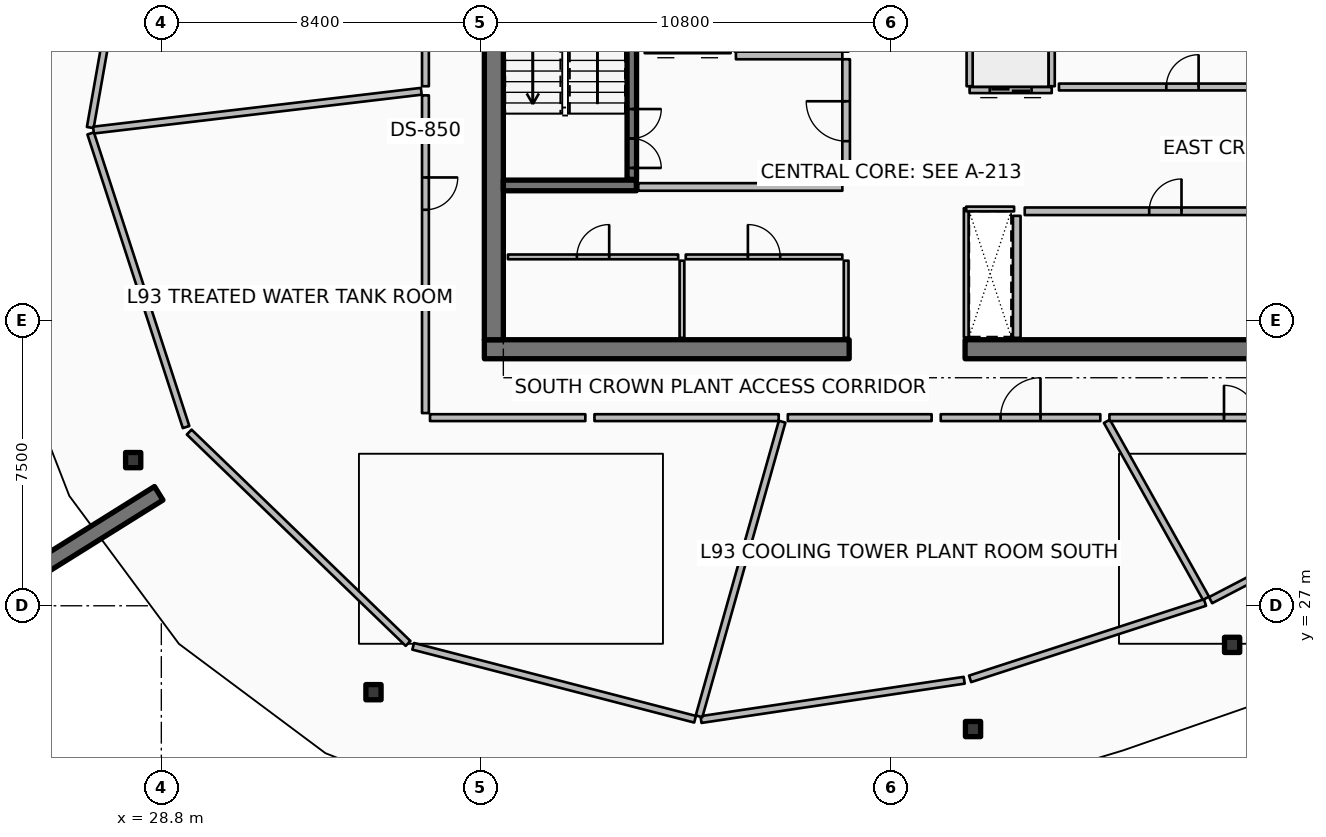
"""IFC4 building model, lengths in metres.
Left out: names, types, materials, properties, quantities, classifications, styles, units other than length and angle.
Written with IfcOpenShell. Run it as: python <this file> out.ifc"""

import sys

from ifc_helpers import new_model, si_unit, direction, frame, frame_2d, origin, origin_2d, place, context, subcontext, project, spatial, rectangle, hollow_rectangle, extrude, element, fill, save


model = new_model("IFC4")
c1 = context("Model", 3, precision=1e-05, world=origin(), true_north=direction((0.0, 1.0)))
c2 = subcontext(c1, "Body", "Model", "MODEL_VIEW")
j1 = project(units=[si_unit("LENGTHUNIT", "METRE"), si_unit("PLANEANGLEUNIT", "RADIAN")], contexts=[c1])
p1 = place(None, origin())
s1 = spatial("IfcSite", under=j1, at=p1, CompositionType="ELEMENT")
p2 = place(p1, origin())
s2 = spatial("IfcBuilding", under=s1, at=p2, CompositionType="ELEMENT")
p3 = place(p2, frame((0.0, 0.0, 370.4)))
s3 = spatial("IfcBuildingStorey", under=s2, at=p3, CompositionType="ELEMENT", Elevation=370.4)
p4 = place(p3, frame((37.3, 33.75, 0.0), z_axis=(0.0, 0.0, 1.0), x_axis=(1.0, 0.0, 0.0)))
e1 = element("IfcWall", 1, at=p4, inside=s3, PredefinedType="SHEAR", context=c2, shape_type="SweptSolid", body=[
    extrude(rectangle(XDim=9.6, YDim=0.5, at=frame_2d((4.8, 0.0))), origin(), (0.0, 0.0, 1.0), 3.6),
])
p5 = place(p3, frame((49.95, 33.75, 0.0), z_axis=(0.0, 0.0, 1.0), x_axis=(1.0, 0.0, 0.0)))
e2 = element("IfcWall", 2, at=p5, inside=s3, PredefinedType="SHEAR", context=c2, shape_type="SweptSolid", body=[
    extrude(rectangle(XDim=9.6, YDim=0.5, at=frame_2d((4.8, 0.0))), origin(), (0.0, 0.0, 1.0), 3.6),
])
p6 = place(p3, frame((37.55, 34.0, 0.0), z_axis=(0.0, 0.0, 1.0), x_axis=(0.0, 1.0, 0.0)))
e3 = element("IfcWall", 3, at=p6, inside=s3, PredefinedType="SHEAR", context=c2, shape_type="SweptSolid", body=[
    extrude(rectangle(XDim=16.0, YDim=0.5, at=frame_2d((8.0, 0.0))), origin(), (0.0, 0.0, 1.0), 3.6),
])
p7 = place(p3, frame((37.8, 38.06, 0.0), z_axis=(0.0, 0.0, 1.0), x_axis=(1.0, 0.0, 0.0)))
e4 = element("IfcWall", 4, at=p7, inside=s3, PredefinedType="SHEAR", context=c2, shape_type="SweptSolid", body=[
    extrude(rectangle(XDim=3.5, YDim=0.28, at=frame_2d((1.75, 0.0))), origin(), (0.0, 0.0, 1.0), 3.6),
])
p8 = place(p3, frame((28.731, 29.959, 0.0), z_axis=(0.0, 0.0, 1.0), x_axis=(-0.848033572426, -0.529942506352, 0.0)))
e5 = element("IfcWall", 5, at=p8, inside=s3, PredefinedType="SOLIDWALL", context=c2, shape_type="SweptSolid", body=[
    extrude(rectangle(XDim=3.5, YDim=0.42, at=frame_2d((1.75, 0.0))), origin(), (0.0, 0.0, 1.0), 3.6),
])
for number, where, z_axis, x_axis in (
    (6, (28.059, 30.833, 0.0), (0.0, 0.0, 1.0), (1.0, 0.0, 0.0)),
    (7, (34.383, 24.726, 0.0), (0.0, 0.0, 1.0), (1.0, 0.0, 0.0)),
    (8, (50.159, 23.756, 0.0), (0.0, 0.0, 1.0), (1.0, 0.0, 0.0)),
    (9, (56.977, 25.971, 0.0), (0.0, 0.0, 1.0), (1.0, 0.0, 0.0)),
):
    element("IfcColumn", number, at=place(p3, frame(where, z_axis=z_axis, x_axis=x_axis)), inside=s3, PredefinedType="COLUMN", context=c2, shape_type="SweptSolid", body=[
        extrude(hollow_rectangle(XDim=0.4, YDim=0.4, WallThickness=0.02, InnerFilletRadius=0.02, OuterFilletRadius=0.04, at=origin_2d()), origin(), (0.0, 0.0, 1.0), 3.32),
    ])
p9 = place(p3, frame((41.18, 38.22, 0.0), z_axis=(0.0, 0.0, 1.0), x_axis=(0.0, 1.0, 0.0)))
e10 = element("IfcWall", 10, at=p9, inside=s3, PredefinedType="SOLIDWALL", context=c2, shape_type="SweptSolid", body=[
    extrude(rectangle(XDim=7.56, YDim=0.25, at=frame_2d((3.78, 0.0))), origin(), (0.0, 0.0, 1.0), 3.32),
])
p10 = place(p9, frame((0.3, 0.0, 0.0)))
e11 = element("IfcOpeningElement", 11, at=p10, cuts=e10, PredefinedType="OPENING", context=c2, shape_type="SweptSolid", body=[
    extrude(rectangle(XDim=1.55, YDim=2.15, at=frame_2d((0.775, 1.075))), frame((0.0, 0.135, 0.0), z_axis=(0.0, -1.0, 0.0), x_axis=(1.0, 0.0, 0.0)), (0.0, 0.0, 1.0), 0.27),
])
p11 = place(p3, frame((51.52, 37.38, 0.0), z_axis=(0.0, 0.0, 1.0), x_axis=(1.0, 0.0, 0.0)))
e12 = element("IfcWall", 12, at=p11, inside=s3, PredefinedType="PARTITIONING", context=c2, shape_type="SweptSolid", body=[
    extrude(rectangle(XDim=7.4, YDim=0.2, at=frame_2d((3.7, 0.0))), origin(), (0.0, 0.0, 1.0), 3.32),
])
p12 = place(p11, frame((3.275, 0.0, 0.0)))
e13 = element("IfcOpeningElement", 13, at=p12, cuts=e12, PredefinedType="OPENING", context=c2, shape_type="SweptSolid", body=[
    extrude(rectangle(XDim=0.85, YDim=2.06, at=frame_2d((0.425, 1.03))), frame((0.0, 0.11, 0.0), z_axis=(0.0, -1.0, 0.0), x_axis=(1.0, 0.0, 0.0)), (0.0, 0.0, 1.0), 0.22),
])
p13 = place(p3, frame((51.31, 34.05, 0.0), z_axis=(0.0, 0.0, 1.0), x_axis=(0.0, 1.0, 0.0)))
e14 = element("IfcWall", 14, at=p13, inside=s3, PredefinedType="PARTITIONING", context=c2, shape_type="SweptSolid", body=[
    extrude(rectangle(XDim=3.21, YDim=0.2, at=frame_2d((1.605, 0.0))), origin(), (0.0, 0.0, 1.0), 3.32),
])
p14 = place(p3, frame((43.78, 41.62, 0.0), z_axis=(0.0, 0.0, 1.0), x_axis=(-1.0, 0.0, 0.0)))
e15 = element("IfcWall", 15, at=p14, inside=s3, PredefinedType="PARTITIONING", context=c2, shape_type="SweptSolid", body=[
    extrude(rectangle(XDim=2.26, YDim=0.16, at=frame_2d((1.13, 0.0))), origin(), (0.0, 0.0, 1.0), 3.32),
])
p15 = place(p14, frame((0.58, 0.0, 0.0)))
e16 = element("IfcOpeningElement", 16, at=p15, cuts=e15, PredefinedType="OPENING", context=c2, shape_type="SweptSolid", body=[
    extrude(rectangle(XDim=1.1, YDim=2.1, at=frame_2d((0.55, 1.05))), frame((0.0, 0.09, 0.0), z_axis=(0.0, -1.0, 0.0), x_axis=(1.0, 0.0, 0.0)), (0.0, 0.0, 1.0), 0.18),
])
p16 = place(p3, frame((52.23, 40.57, 0.0), z_axis=(0.0, 0.0, 1.0), x_axis=(-1.0, 0.0, 0.0)))
e17 = element("IfcWall", 17, at=p16, inside=s3, PredefinedType="PARTITIONING", context=c2, shape_type="SweptSolid", body=[
    extrude(rectangle(XDim=2.16, YDim=0.16, at=frame_2d((1.08, 0.0))), origin(), (0.0, 0.0, 1.0), 3.32),
])
p17 = place(p16, frame((0.53, 0.0, 0.0)))
e18 = element("IfcOpeningElement", 18, at=p17, cuts=e17, PredefinedType="OPENING", context=c2, shape_type="SweptSolid", body=[
    extrude(rectangle(XDim=1.1, YDim=2.1, at=frame_2d((0.55, 1.05))), frame((0.0, 0.09, 0.0), z_axis=(0.0, -1.0, 0.0), x_axis=(1.0, 0.0, 0.0)), (0.0, 0.0, 1.0), 0.18),
])
for number, where, z_axis, x_axis in (
    (19, (52.23, 40.67, 0.0), (0.0, 0.0, 1.0), (0.0, 1.0, 0.0)),
    (20, (50.07, 40.67, 0.0), (0.0, 0.0, 1.0), (0.0, 1.0, 0.0)),
):
    element("IfcWall", number, at=place(p3, frame(where, z_axis=z_axis, x_axis=x_axis)), inside=s3, PredefinedType="PARTITIONING", context=c2, shape_type="SweptSolid", body=[
        extrude(rectangle(XDim=2.16, YDim=0.16, at=frame_2d((1.08, 0.0))), origin(), (0.0, 0.0, 1.0), 3.32),
    ])
p18 = place(p3, frame((52.42, 40.65, 0.0), z_axis=(0.0, 0.0, 1.0), x_axis=(1.0, 0.0, 0.0)))
e21 = element("IfcWall", 21, at=p18, inside=s3, PredefinedType="PARTITIONING", context=c2, shape_type="SweptSolid", body=[
    extrude(rectangle(XDim=6.5, YDim=0.18, at=frame_2d((3.25, 0.0))), origin(), (0.0, 0.0, 1.0), 3.32),
])
p19 = place(p18, frame((2.825, 0.0, 0.0)))
e22 = element("IfcOpeningElement", 22, at=p19, cuts=e21, PredefinedType="OPENING", context=c2, shape_type="SweptSolid", body=[
    extrude(rectangle(XDim=0.85, YDim=2.06, at=frame_2d((0.425, 1.03))), frame((0.0, 0.1, 0.0), z_axis=(0.0, -1.0, 0.0), x_axis=(1.0, 0.0, 0.0)), (0.0, 0.0, 1.0), 0.2),
])
for number, where, z_axis, x_axis in (
    (23, (46.82, 34.05, 0.0), (0.0, 0.0, 1.0), (0.0, 1.0, 0.0)),
    (24, (42.5, 34.05, 0.0), (0.0, 0.0, 1.0), (0.0, 1.0, 0.0)),
):
    element("IfcWall", number, at=place(p3, frame(where, z_axis=z_axis, x_axis=x_axis)), inside=s3, PredefinedType="PARTITIONING", context=c2, shape_type="SweptSolid", body=[
        extrude(rectangle(XDim=2.03, YDim=0.125, at=frame_2d((1.015, 0.0))), origin(), (0.0, 0.0, 1.0), 2.76),
    ])
p20 = place(p3, frame((37.92, 36.18, 0.0), z_axis=(0.0, 0.0, 1.0), x_axis=(1.0, 0.0, 0.0)))
e25 = element("IfcWall", 25, at=p20, inside=s3, PredefinedType="PARTITIONING", context=c2, shape_type="SweptSolid", body=[
    extrude(rectangle(XDim=4.48, YDim=0.125, at=frame_2d((2.24, 0.0))), origin(), (0.0, 0.0, 1.0), 2.76),
])
p21 = place(p20, frame((1.815, 0.0, 0.0)))
e26 = element("IfcOpeningElement", 26, at=p21, cuts=e25, PredefinedType="OPENING", context=c2, shape_type="SweptSolid", body=[
    extrude(rectangle(XDim=0.85, YDim=2.06, at=frame_2d((0.425, 1.03))), frame((0.0, 0.073, 0.0), z_axis=(0.0, -1.0, 0.0), x_axis=(1.0, 0.0, 0.0)), (0.0, 0.0, 1.0), 0.145),
])
p22 = place(p3, frame((42.6, 36.18, 0.0), z_axis=(0.0, 0.0, 1.0), x_axis=(1.0, 0.0, 0.0)))
e27 = element("IfcWall", 27, at=p22, inside=s3, PredefinedType="PARTITIONING", context=c2, shape_type="SweptSolid", body=[
    extrude(rectangle(XDim=4.12, YDim=0.125, at=frame_2d((2.06, 0.0))), origin(), (0.0, 0.0, 1.0), 2.76),
])
p23 = place(p22, frame((1.635, 0.0, 0.0)))
e28 = element("IfcOpeningElement", 28, at=p23, cuts=e27, PredefinedType="OPENING", context=c2, shape_type="SweptSolid", body=[
    extrude(rectangle(XDim=0.85, YDim=2.06, at=frame_2d((0.425, 1.03))), frame((0.0, 0.073, 0.0), z_axis=(0.0, -1.0, 0.0), x_axis=(1.0, 0.0, 0.0)), (0.0, 0.0, 1.0), 0.145),
])
p24 = place(p3, frame((41.35, 38.02, 0.0), z_axis=(0.0, 0.0, 1.0), x_axis=(1.0, 0.0, 0.0)))
e29 = element("IfcWall", 29, at=p24, inside=s3, PredefinedType="PARTITIONING", context=c2, shape_type="SweptSolid", body=[
    extrude(rectangle(XDim=5.37, YDim=0.2, at=frame_2d((2.685, 0.0))), origin(), (0.0, 0.0, 1.0), 3.32),
])
p25 = place(p3, frame((43.92, 41.48, 0.0), z_axis=(0.0, 0.0, 1.0), x_axis=(1.0, 0.0, 0.0)))
e30 = element("IfcWall", 30, at=p25, inside=s3, PredefinedType="PARTITIONING", context=c2, shape_type="SweptSolid", body=[
    extrude(rectangle(XDim=2.8, YDim=0.2, at=frame_2d((1.4, 0.0))), origin(), (0.0, 0.0, 1.0), 3.32),
])
p26 = place(p3, frame((46.82, 38.12, 0.0), z_axis=(0.0, 0.0, 1.0), x_axis=(0.0, 1.0, 0.0)))
e31 = element("IfcWall", 31, at=p26, inside=s3, PredefinedType="PARTITIONING", context=c2, shape_type="SweptSolid", body=[
    extrude(rectangle(XDim=3.26, YDim=0.2, at=frame_2d((1.63, 0.0))), origin(), (0.0, 0.0, 1.0), 3.32),
])
p27 = place(p26, frame((1.105, 0.0, 0.0)))
e32 = element("IfcOpeningElement", 32, at=p27, cuts=e31, PredefinedType="OPENING", context=c2, shape_type="SweptSolid", body=[
    extrude(rectangle(XDim=1.05, YDim=2.1, at=frame_2d((0.525, 1.05))), frame((0.0, 0.11, 0.0), z_axis=(0.0, -1.0, 0.0), x_axis=(1.0, 0.0, 0.0)), (0.0, 0.0, 1.0), 0.22),
])
p28 = place(p3, frame((49.98, 34.06, 0.0), z_axis=(0.0, 0.0, 1.0), x_axis=(0.0, 1.0, 0.0)))
e33 = element("IfcWall", 33, at=p28, inside=s3, PredefinedType="PARTITIONING", context=c2, shape_type="SweptSolid", body=[
    extrude(rectangle(XDim=3.4, YDim=0.125, at=frame_2d((1.7, 0.0))), origin(), (0.0, 0.0, 1.0), 2.76),
])
p29 = place(p3, frame((49.98, 37.44, 0.0), z_axis=(0.0, 0.0, 1.0), x_axis=(1.0, 0.0, 0.0)))
e34 = element("IfcWall", 34, at=p29, inside=s3, PredefinedType="PARTITIONING", context=c2, shape_type="SweptSolid", body=[
    extrude(rectangle(XDim=1.26, YDim=0.125, at=frame_2d((0.63, 0.0))), origin(), (0.0, 0.0, 1.0), 2.76),
])
p30 = place(p3, frame((28.32, 47.468, 0.0), z_axis=(0.0, 0.0, 1.0), x_axis=(-0.173668776466, -0.984804120666, 0.0)))
e35 = element("IfcWall", 35, at=p30, inside=s3, PredefinedType="PARTITIONING", context=c2, shape_type="SweptSolid", body=[
    extrude(rectangle(XDim=8.006, YDim=0.18, at=frame_2d((4.003, 0.0))), origin(), (0.0, 0.0, 1.0), 2.76),
])
p31 = place(p3, frame((26.941, 39.428, 0.0), z_axis=(0.0, 0.0, 1.0), x_axis=(0.309024234991, -0.951054163646, 0.0)))
e36 = element("IfcWall", 36, at=p31, inside=s3, PredefinedType="PARTITIONING", context=c2, shape_type="SweptSolid", body=[
    extrude(rectangle(XDim=8.124, YDim=0.18, at=frame_2d((4.062, 0.0))), origin(), (0.0, 0.0, 1.0), 2.76),
])
p32 = place(p3, frame((29.533, 31.57, 0.0), z_axis=(0.0, 0.0, 1.0), x_axis=(0.719364153135, -0.694633151516, 0.0)))
e37 = element("IfcWall", 37, at=p32, inside=s3, PredefinedType="PARTITIONING", context=c2, shape_type="SweptSolid", body=[
    extrude(rectangle(XDim=8.006, YDim=0.18, at=frame_2d((4.003, 0.0))), origin(), (0.0, 0.0, 1.0), 2.76),
])
p33 = place(p3, frame((35.427, 25.934, 0.0), z_axis=(0.0, 0.0, 1.0), x_axis=(0.968117205342, -0.250497658115, 0.0)))
e38 = element("IfcWall", 38, at=p33, inside=s3, PredefinedType="PARTITIONING", context=c2, shape_type="SweptSolid", body=[
    extrude(rectangle(XDim=7.662, YDim=0.18, at=frame_2d((3.831, 0.0))), origin(), (0.0, 0.0, 1.0), 2.76),
])
p34 = place(p3, frame((43.001, 24.006, 0.0), z_axis=(0.0, 0.0, 1.0), x_axis=(0.989034336252, 0.147685753256, 0.0)))
e39 = element("IfcWall", 39, at=p34, inside=s3, PredefinedType="PARTITIONING", context=c2, shape_type="SweptSolid", body=[
    extrude(rectangle(XDim=7.003, YDim=0.18, at=frame_2d((3.501, 0.0))), origin(), (0.0, 0.0, 1.0), 2.76),
])
p35 = place(p3, frame((50.082, 25.077, 0.0), z_axis=(0.0, 0.0, 1.0), x_axis=(0.95105283999, 0.309028308649, 0.0)))
e40 = element("IfcWall", 40, at=p35, inside=s3, PredefinedType="PARTITIONING", context=c2, shape_type="SweptSolid", body=[
    extrude(rectangle(XDim=6.499, YDim=0.18, at=frame_2d((3.25, 0.0))), origin(), (0.0, 0.0, 1.0), 2.76),
])
p36 = place(p3, frame((56.41, 27.147, 0.0), z_axis=(0.0, 0.0, 1.0), x_axis=(0.886949494865, 0.461866423935, 0.0)))
e41 = element("IfcWall", 41, at=p36, inside=s3, PredefinedType="PARTITIONING", context=c2, shape_type="SweptSolid", body=[
    extrude(rectangle(XDim=7.002, YDim=0.18, at=frame_2d((3.501, 0.0))), origin(), (0.0, 0.0, 1.0), 2.76),
])
p37 = place(p3, frame((35.75, 45.335, 0.0), z_axis=(0.0, 0.0, 1.0), x_axis=(0.0, -1.0, 0.0)))
e42 = element("IfcWall", 42, at=p37, inside=s3, PredefinedType="PARTITIONING", context=c2, shape_type="SweptSolid", body=[
    extrude(rectangle(XDim=4.665, YDim=0.18, at=frame_2d((2.333, 0.0))), origin(), (0.0, 0.0, 1.0), 2.76),
])
p38 = place(p3, frame((35.641, 40.537, 0.0), z_axis=(0.0, 0.0, 1.0), x_axis=(-0.993070751419, -0.117518010011, 0.0)))
e43 = element("IfcWall", 43, at=p38, inside=s3, PredefinedType="PARTITIONING", context=c2, shape_type="SweptSolid", body=[
    extrude(rectangle(XDim=8.686, YDim=0.18, at=frame_2d((4.343, 0.0))), origin(), (0.0, 0.0, 1.0), 2.76),
])
p39 = place(p3, frame((35.75, 40.43, 0.0), z_axis=(0.0, 0.0, 1.0), x_axis=(0.0, -1.0, 0.0)))
e44 = element("IfcWall", 44, at=p39, inside=s3, PredefinedType="PARTITIONING", context=c2, shape_type="SweptSolid", body=[
    extrude(rectangle(XDim=5.17, YDim=0.18, at=frame_2d((2.585, 0.0))), origin(), (0.0, 0.0, 1.0), 2.76),
])
p40 = place(p39, frame((2.16, 0.0, 0.0)))
e45 = element("IfcOpeningElement", 45, at=p40, cuts=e44, PredefinedType="OPENING", context=c2, shape_type="SweptSolid", body=[
    extrude(rectangle(XDim=0.85, YDim=2.06, at=frame_2d((0.425, 1.03))), frame((0.0, 0.1, 0.0), z_axis=(0.0, -1.0, 0.0), x_axis=(1.0, 0.0, 0.0)), (0.0, 0.0, 1.0), 0.2),
])
p41 = place(p3, frame((35.75, 35.02, 0.0), z_axis=(0.0, 0.0, 1.0), x_axis=(0.0, -1.0, 0.0)))
e46 = element("IfcWall", 46, at=p41, inside=s3, PredefinedType="PARTITIONING", context=c2, shape_type="SweptSolid", body=[
    extrude(rectangle(XDim=2.95, YDim=0.18, at=frame_2d((1.475, 0.0))), origin(), (0.0, 0.0, 1.0), 2.76),
])
p42 = place(p3, frame((35.87, 31.95, 0.0), z_axis=(0.0, 0.0, 1.0), x_axis=(1.0, 0.0, 0.0)))
e47 = element("IfcWall", 47, at=p42, inside=s3, PredefinedType="PARTITIONING", context=c2, shape_type="SweptSolid", body=[
    extrude(rectangle(XDim=4.087, YDim=0.18, at=frame_2d((2.043, 0.0))), origin(), (0.0, 0.0, 1.0), 2.76),
])
p43 = place(p3, frame((40.197, 31.95, 0.0), z_axis=(0.0, 0.0, 1.0), x_axis=(1.0, 0.0, 0.0)))
e48 = element("IfcWall", 48, at=p43, inside=s3, PredefinedType="PARTITIONING", context=c2, shape_type="SweptSolid", body=[
    extrude(rectangle(XDim=4.848, YDim=0.18, at=frame_2d((2.424, 0.0))), origin(), (0.0, 0.0, 1.0), 2.76),
])
p44 = place(p3, frame((45.136, 31.844, 0.0), z_axis=(0.0, 0.0, 1.0), x_axis=(-0.271457285698, -0.962450488099, 0.0)))
e49 = element("IfcWall", 49, at=p44, inside=s3, PredefinedType="PARTITIONING", context=c2, shape_type="SweptSolid", body=[
    extrude(rectangle(XDim=8.056, YDim=0.18, at=frame_2d((4.028, 0.0))), origin(), (0.0, 0.0, 1.0), 2.76),
])
p45 = place(p3, frame((45.286, 31.95, 0.0), z_axis=(0.0, 0.0, 1.0), x_axis=(1.0, 0.0, 0.0)))
e50 = element("IfcWall", 50, at=p45, inside=s3, PredefinedType="PARTITIONING", context=c2, shape_type="SweptSolid", body=[
    extrude(rectangle(XDim=3.784, YDim=0.18, at=frame_2d((1.892, 0.0))), origin(), (0.0, 0.0, 1.0), 2.76),
])
p46 = place(p3, frame((49.31, 31.95, 0.0), z_axis=(0.0, 0.0, 1.0), x_axis=(1.0, 0.0, 0.0)))
e51 = element("IfcWall", 51, at=p46, inside=s3, PredefinedType="PARTITIONING", context=c2, shape_type="SweptSolid", body=[
    extrude(rectangle(XDim=4.199, YDim=0.18, at=frame_2d((2.099, 0.0))), origin(), (0.0, 0.0, 1.0), 2.76),
])
p47 = place(p46, frame((1.574, 0.0, 0.0)))
e52 = element("IfcOpeningElement", 52, at=p47, cuts=e51, PredefinedType="OPENING", context=c2, shape_type="SweptSolid", body=[
    extrude(rectangle(XDim=1.05, YDim=2.1, at=frame_2d((0.525, 1.05))), frame((0.0, 0.1, 0.0), z_axis=(0.0, -1.0, 0.0), x_axis=(1.0, 0.0, 0.0)), (0.0, 0.0, 1.0), 0.2),
])
p48 = place(p3, frame((53.682, 31.854, 0.0), z_axis=(0.0, 0.0, 1.0), x_axis=(0.488622869326, -0.872495095443, 0.0)))
e53 = element("IfcWall", 53, at=p48, inside=s3, PredefinedType="PARTITIONING", context=c2, shape_type="SweptSolid", body=[
    extrude(rectangle(XDim=5.337, YDim=0.18, at=frame_2d((2.668, 0.0))), origin(), (0.0, 0.0, 1.0), 2.76),
])
p49 = place(p3, frame((53.748, 31.95, 0.0), z_axis=(0.0, 0.0, 1.0), x_axis=(1.0, 0.0, 0.0)))
e54 = element("IfcWall", 54, at=p49, inside=s3, PredefinedType="PARTITIONING", context=c2, shape_type="SweptSolid", body=[
    extrude(rectangle(XDim=6.88, YDim=0.18, at=frame_2d((3.44, 0.0))), origin(), (0.0, 0.0, 1.0), 2.76),
])
p50 = place(p49, frame((3.015, 0.0, 0.0)))
e55 = element("IfcOpeningElement", 55, at=p50, cuts=e54, PredefinedType="OPENING", context=c2, shape_type="SweptSolid", body=[
    extrude(rectangle(XDim=0.85, YDim=2.06, at=frame_2d((0.425, 1.03))), frame((0.0, 0.1, 0.0), z_axis=(0.0, -1.0, 0.0), x_axis=(1.0, 0.0, 0.0)), (0.0, 0.0, 1.0), 0.2),
])
p51 = place(p10, origin())
e56 = element("IfcDoor", 56, at=p51, inside=s3, OperationType="DOUBLE_DOOR_SINGLE_SWING", PredefinedType="DOOR", context=c2, shape_type="SweptSolid", body=[
    extrude(rectangle(XDim=1.55, YDim=2.15, at=frame_2d((0.775, 1.075))), frame((0.0, 0.025, 0.0), z_axis=(0.0, -1.0, 0.0), x_axis=(1.0, 0.0, 0.0)), (0.0, 0.0, 1.0), 0.05),
])
fill(e11, e56)
p52 = place(p12, origin())
e57 = element("IfcDoor", 57, at=p52, inside=s3, OperationType="SINGLE_SWING_RIGHT", PredefinedType="DOOR", context=c2, shape_type="SweptSolid", body=[
    extrude(rectangle(XDim=0.85, YDim=2.06, at=frame_2d((0.425, 1.03))), frame((0.0, 0.025, 0.0), z_axis=(0.0, -1.0, 0.0), x_axis=(1.0, 0.0, 0.0)), (0.0, 0.0, 1.0), 0.05),
])
fill(e13, e57)
p53 = place(p17, origin())
e58 = element("IfcDoor", 58, at=p53, inside=s3, OperationType="DOUBLE_DOOR_SLIDING", PredefinedType="DOOR", context=c2, shape_type="SweptSolid", body=[
    extrude(rectangle(XDim=1.1, YDim=2.1, at=frame_2d((0.55, 1.05))), frame((0.0, 0.025, 0.0), z_axis=(0.0, -1.0, 0.0), x_axis=(1.0, 0.0, 0.0)), (0.0, 0.0, 1.0), 0.05),
])
fill(e18, e58)
p54 = place(p19, origin())
e59 = element("IfcDoor", 59, at=p54, inside=s3, OperationType="SINGLE_SWING_RIGHT", PredefinedType="DOOR", context=c2, shape_type="SweptSolid", body=[
    extrude(rectangle(XDim=0.85, YDim=2.06, at=frame_2d((0.425, 1.03))), frame((0.0, 0.025, 0.0), z_axis=(0.0, -1.0, 0.0), x_axis=(1.0, 0.0, 0.0)), (0.0, 0.0, 1.0), 0.05),
])
fill(e22, e59)
p55 = place(p21, origin())
e60 = element("IfcDoor", 60, at=p55, inside=s3, OperationType="SINGLE_SWING_RIGHT", PredefinedType="DOOR", context=c2, shape_type="SweptSolid", body=[
    extrude(rectangle(XDim=0.85, YDim=2.06, at=frame_2d((0.425, 1.03))), frame((0.0, 0.025, 0.0), z_axis=(0.0, -1.0, 0.0), x_axis=(1.0, 0.0, 0.0)), (0.0, 0.0, 1.0), 0.05),
])
fill(e26, e60)
p56 = place(p23, origin())
e61 = element("IfcDoor", 61, at=p56, inside=s3, OperationType="SINGLE_SWING_LEFT", PredefinedType="DOOR", context=c2, shape_type="SweptSolid", body=[
    extrude(rectangle(XDim=0.85, YDim=2.06, at=frame_2d((0.425, 1.03))), frame((0.0, 0.025, 0.0), z_axis=(0.0, -1.0, 0.0), x_axis=(1.0, 0.0, 0.0)), (0.0, 0.0, 1.0), 0.05),
])
fill(e28, e61)
p57 = place(p27, origin())
e62 = element("IfcDoor", 62, at=p57, inside=s3, OperationType="SINGLE_SWING_RIGHT", PredefinedType="DOOR", context=c2, shape_type="SweptSolid", body=[
    extrude(rectangle(XDim=1.05, YDim=2.1, at=frame_2d((0.525, 1.05))), frame((0.0, 0.025, 0.0), z_axis=(0.0, -1.0, 0.0), x_axis=(1.0, 0.0, 0.0)), (0.0, 0.0, 1.0), 0.05),
])
fill(e32, e62)
p58 = place(p40, origin())
e63 = element("IfcDoor", 63, at=p58, inside=s3, OperationType="SINGLE_SWING_LEFT", PredefinedType="DOOR", context=c2, shape_type="SweptSolid", body=[
    extrude(rectangle(XDim=0.85, YDim=2.06, at=frame_2d((0.425, 1.03))), frame((0.0, 0.025, 0.0), z_axis=(0.0, -1.0, 0.0), x_axis=(1.0, 0.0, 0.0)), (0.0, 0.0, 1.0), 0.05),
])
fill(e45, e63)
p59 = place(p47, origin())
e64 = element("IfcDoor", 64, at=p59, inside=s3, OperationType="SINGLE_SWING_RIGHT", PredefinedType="DOOR", context=c2, shape_type="SweptSolid", body=[
    extrude(rectangle(XDim=1.05, YDim=2.1, at=frame_2d((0.525, 1.05))), frame((0.0, 0.025, 0.0), z_axis=(0.0, -1.0, 0.0), x_axis=(1.0, 0.0, 0.0)), (0.0, 0.0, 1.0), 0.05),
])
fill(e52, e64)
p60 = place(p50, origin())
e65 = element("IfcDoor", 65, at=p60, inside=s3, OperationType="SINGLE_SWING_LEFT", PredefinedType="DOOR", context=c2, shape_type="SweptSolid", body=[
    extrude(rectangle(XDim=0.85, YDim=2.06, at=frame_2d((0.425, 1.03))), frame((0.0, 0.025, 0.0), z_axis=(0.0, -1.0, 0.0), x_axis=(1.0, 0.0, 0.0)), (0.0, 0.0, 1.0), 0.05),
])
fill(e55, e65)
save(model, sys.argv[1])
